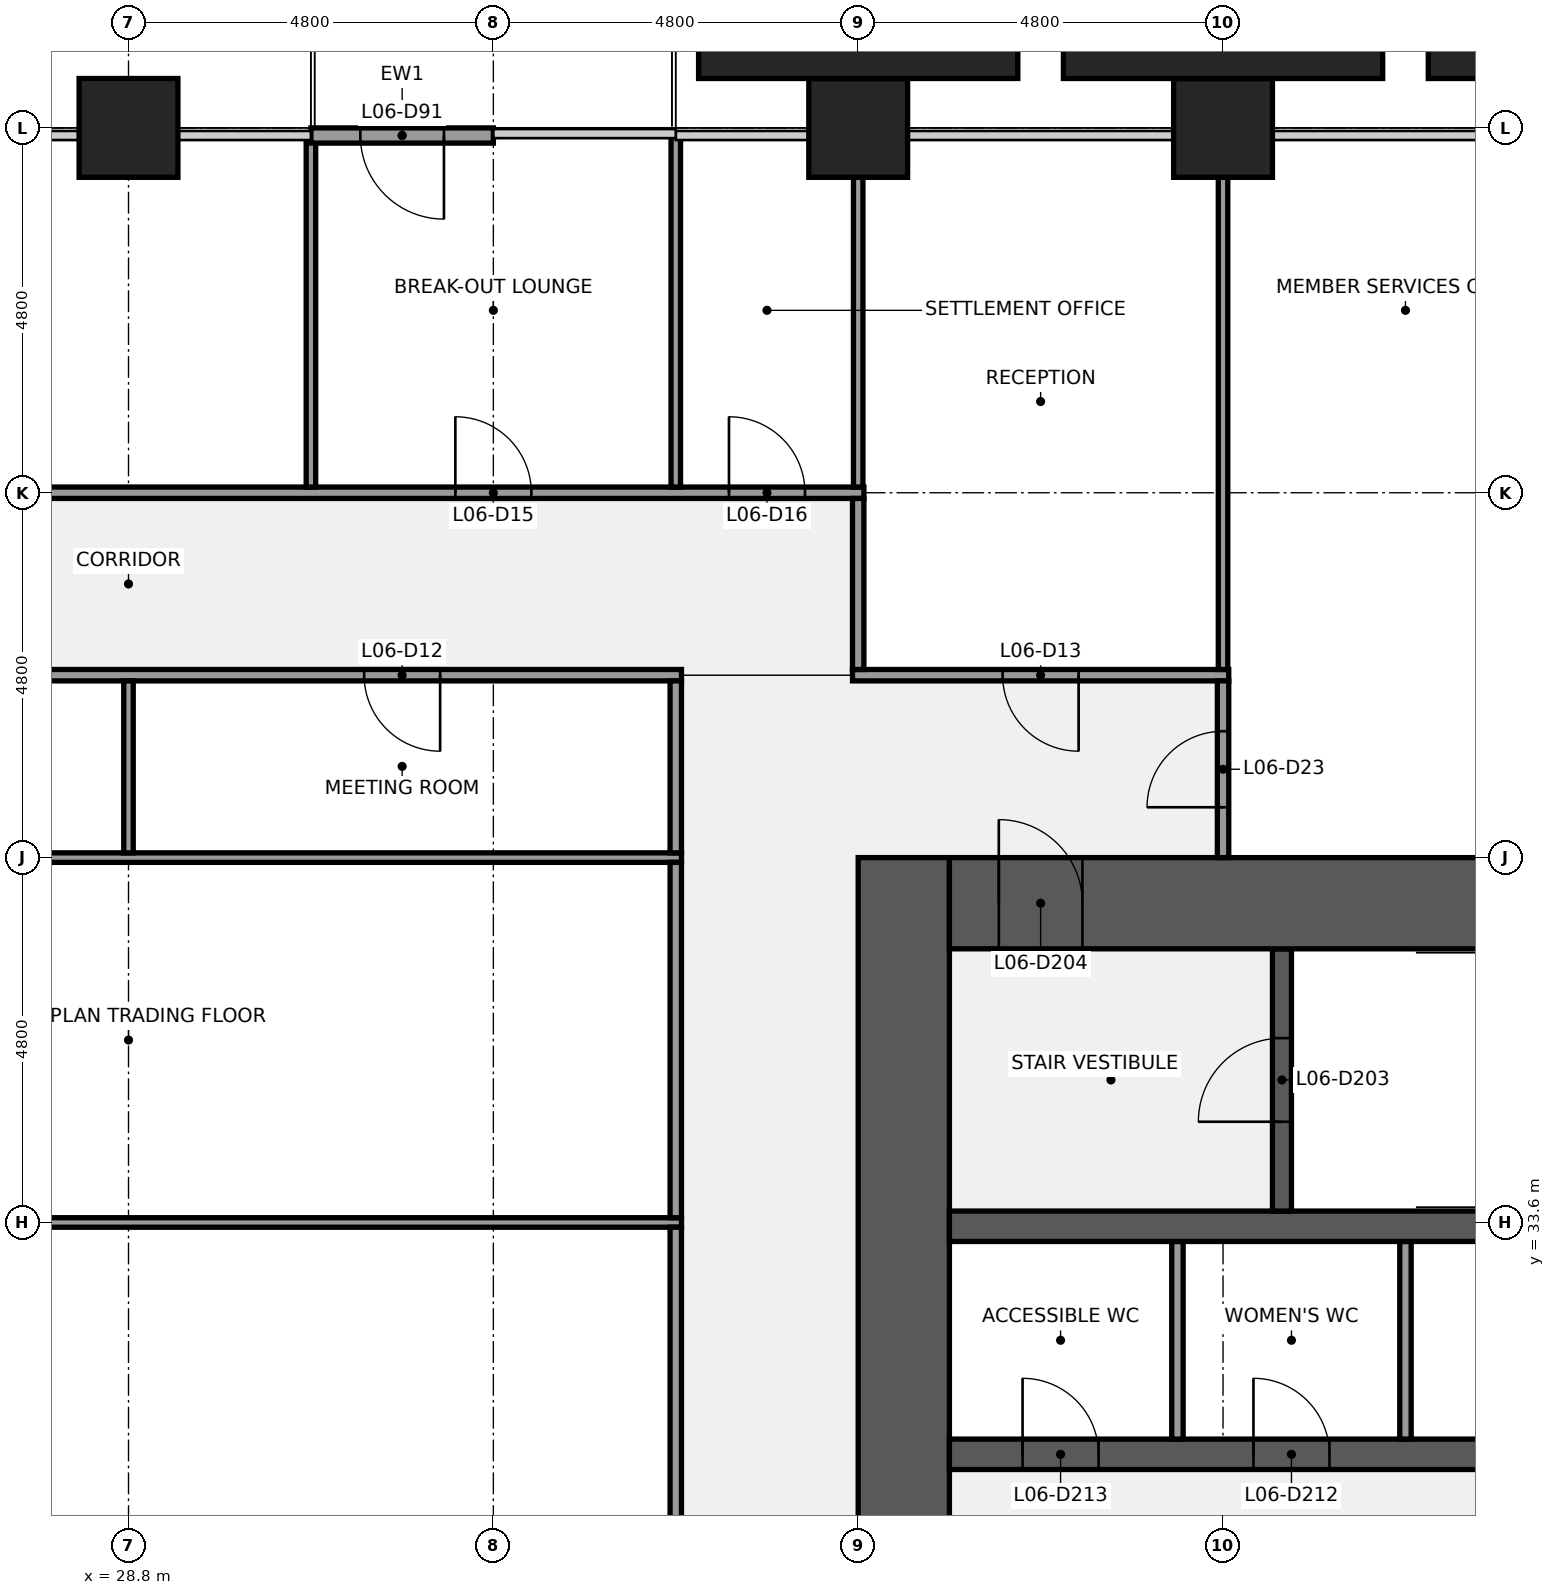
"""IFC4 building model, lengths in metres.
Left out: names, types, materials, properties, quantities, classifications, styles, units other than length and angle.
Written with IfcOpenShell. Run it as: python <this file> out.ifc"""

import sys

from ifc_helpers import new_model, si_unit, direction, frame, frame_2d, origin, origin_2d, place, context, subcontext, project, spatial, rectangle, extrude, element, fill, save


model = new_model("IFC4")
c1 = context("Model", 3, precision=1e-05, world=origin(), true_north=direction((0.0, 1.0)))
c2 = subcontext(c1, "Body", "Model", "MODEL_VIEW")
j1 = project(units=[si_unit("LENGTHUNIT", "METRE"), si_unit("PLANEANGLEUNIT", "RADIAN")], contexts=[c1])
p1 = place(None, origin())
s1 = spatial("IfcSite", under=j1, at=p1, CompositionType="ELEMENT")
p2 = place(p1, origin())
s2 = spatial("IfcBuilding", under=s1, at=p2, CompositionType="ELEMENT")
p3 = place(p2, frame((0.0, 0.0, 34.6)))
s3 = spatial("IfcBuildingStorey", under=s2, at=p3, CompositionType="ELEMENT", Elevation=34.6)
for number, where, z_axis, x_axis in (
    (1, (28.8, 48.0, 0.0), (0.0, 0.0, 1.0), (1.0, 0.0, 0.0)),
    (2, (38.4, 48.0, 0.0), (0.0, 0.0, 1.0), (1.0, 0.0, 0.0)),
    (3, (43.2, 48.0, 0.0), (0.0, 0.0, 1.0), (1.0, 0.0, 0.0)),
):
    element("IfcColumn", number, at=place(p3, frame(where, z_axis=z_axis, x_axis=x_axis)), inside=s3, PredefinedType="COLUMN", context=c2, shape_type="SweptSolid", body=[
        extrude(rectangle(XDim=1.3, YDim=1.3, at=origin_2d()), origin(), (0.0, 0.0, 1.0), 4.4),
    ])
p4 = place(p3, frame((39.0, 9.6, 0.0), z_axis=(0.0, 0.0, 1.0), x_axis=(0.0, 1.0, 0.0)))
e4 = element("IfcWall", 4, at=p4, inside=s3, PredefinedType="SHEAR", context=c2, shape_type="SweptSolid", body=[
    extrude(rectangle(XDim=28.8, YDim=1.2, at=frame_2d((14.4, 0.0))), origin(), (0.0, 0.0, 1.0), 4.24),
])
p5 = place(p4, frame((8.7, 0.0, 0.0)))
e5 = element("IfcOpeningElement", 5, at=p5, cuts=e4, PredefinedType="OPENING", context=c2, shape_type="SweptSolid", body=[
    extrude(rectangle(XDim=1.8, YDim=2.1, at=frame_2d((0.9, 1.05))), frame((0.0, 0.61, 0.0), z_axis=(0.0, -1.0, 0.0), x_axis=(1.0, 0.0, 0.0)), (0.0, 0.0, 1.0), 1.22),
])
p6 = place(p4, frame((18.3, 0.0, 0.0)))
e6 = element("IfcOpeningElement", 6, at=p6, cuts=e4, PredefinedType="OPENING", context=c2, shape_type="SweptSolid", body=[
    extrude(rectangle(XDim=1.8, YDim=2.1, at=frame_2d((0.9, 1.05))), frame((0.0, 0.61, 0.0), z_axis=(0.0, -1.0, 0.0), x_axis=(1.0, 0.0, 0.0)), (0.0, 0.0, 1.0), 1.22),
])
p7 = place(p3, frame((39.6, 30.55, 0.0), z_axis=(0.0, 0.0, 1.0), x_axis=(1.0, 0.0, 0.0)))
e7 = element("IfcWall", 7, at=p7, inside=s3, PredefinedType="SHEAR", context=c2, shape_type="SweptSolid", body=[
    extrude(rectangle(XDim=16.8, YDim=0.4, at=frame_2d((8.4, 0.0))), origin(), (0.0, 0.0, 1.0), 4.24),
])
p8 = place(p7, frame((15.137, 0.0, 0.0)))
e8 = element("IfcOpeningElement", 8, at=p8, cuts=e7, PredefinedType="OPENING", context=c2, shape_type="SweptSolid", body=[
    extrude(rectangle(XDim=1.0, YDim=2.1, at=frame_2d((0.5, 1.05))), frame((0.0, 0.21, 0.0), z_axis=(0.0, -1.0, 0.0), x_axis=(1.0, 0.0, 0.0)), (0.0, 0.0, 1.0), 0.42),
])
p9 = place(p7, frame((12.7, 0.0, 0.0)))
e9 = element("IfcOpeningElement", 9, at=p9, cuts=e7, PredefinedType="OPENING", context=c2, shape_type="SweptSolid", body=[
    extrude(rectangle(XDim=1.0, YDim=2.1, at=frame_2d((0.5, 1.05))), frame((0.0, 0.21, 0.0), z_axis=(0.0, -1.0, 0.0), x_axis=(1.0, 0.0, 0.0)), (0.0, 0.0, 1.0), 0.42),
])
p10 = place(p7, frame((8.5, 0.0, 0.0)))
e10 = element("IfcOpeningElement", 10, at=p10, cuts=e7, PredefinedType="OPENING", context=c2, shape_type="SweptSolid", body=[
    extrude(rectangle(XDim=1.0, YDim=2.1, at=frame_2d((0.5, 1.05))), frame((0.0, 0.21, 0.0), z_axis=(0.0, -1.0, 0.0), x_axis=(1.0, 0.0, 0.0)), (0.0, 0.0, 1.0), 0.42),
])
p11 = place(p7, frame((4.0, 0.0, 0.0)))
e11 = element("IfcOpeningElement", 11, at=p11, cuts=e7, PredefinedType="OPENING", context=c2, shape_type="SweptSolid", body=[
    extrude(rectangle(XDim=1.0, YDim=2.1, at=frame_2d((0.5, 1.05))), frame((0.0, 0.21, 0.0), z_axis=(0.0, -1.0, 0.0), x_axis=(1.0, 0.0, 0.0)), (0.0, 0.0, 1.0), 0.42),
])
p12 = place(p7, frame((0.962, 0.0, 0.0)))
e12 = element("IfcOpeningElement", 12, at=p12, cuts=e7, PredefinedType="OPENING", context=c2, shape_type="SweptSolid", body=[
    extrude(rectangle(XDim=1.0, YDim=2.1, at=frame_2d((0.5, 1.05))), frame((0.0, 0.21, 0.0), z_axis=(0.0, -1.0, 0.0), x_axis=(1.0, 0.0, 0.0)), (0.0, 0.0, 1.0), 0.42),
])
for number, where, z_axis, x_axis in (
    (13, (45.6, 30.75, 0.0), (0.0, 0.0, 1.0), (0.0, 1.0, 0.0)),
    (14, (42.6, 30.75, 0.0), (0.0, 0.0, 1.0), (0.0, 1.0, 0.0)),
):
    element("IfcWall", number, at=place(p3, frame(where, z_axis=z_axis, x_axis=x_axis)), inside=s3, PredefinedType="PARTITIONING", context=c2, shape_type="SweptSolid", body=[
        extrude(rectangle(XDim=2.6, YDim=0.15, at=frame_2d((1.3, 0.0))), origin(), (0.0, 0.0, 1.0), 4.24),
    ])
p13 = place(p3, frame((39.6, 33.55, 0.0), z_axis=(0.0, 0.0, 1.0), x_axis=(1.0, 0.0, 0.0)))
e15 = element("IfcWall", 15, at=p13, inside=s3, PredefinedType="SHEAR", context=c2, shape_type="SweptSolid", body=[
    extrude(rectangle(XDim=16.8, YDim=0.4, at=frame_2d((8.4, 0.0))), origin(), (0.0, 0.0, 1.0), 4.24),
])
p14 = place(p3, frame((43.975, 33.75, 0.0), z_axis=(0.0, 0.0, 1.0), x_axis=(0.0, 1.0, 0.0)))
e16 = element("IfcWall", 16, at=p14, inside=s3, PredefinedType="SHEAR", context=c2, shape_type="SweptSolid", body=[
    extrude(rectangle(XDim=3.45, YDim=0.25, at=frame_2d((1.725, 0.0))), origin(), (0.0, 0.0, 1.0), 4.24),
])
p15 = place(p14, frame((1.175, 0.0, 0.0)))
e17 = element("IfcOpeningElement", 17, at=p15, cuts=e16, PredefinedType="OPENING", context=c2, shape_type="SweptSolid", body=[
    extrude(rectangle(XDim=1.1, YDim=2.1, at=frame_2d((0.55, 1.05))), frame((0.0, 0.135, 0.0), z_axis=(0.0, -1.0, 0.0), x_axis=(1.0, 0.0, 0.0)), (0.0, 0.0, 1.0), 0.27),
])
p16 = place(p3, frame((39.6, 37.8, 0.0), z_axis=(0.0, 0.0, 1.0), x_axis=(1.0, 0.0, 0.0)))
e18 = element("IfcWall", 18, at=p16, inside=s3, PredefinedType="SHEAR", context=c2, shape_type="SweptSolid", body=[
    extrude(rectangle(XDim=13.2, YDim=1.2, at=frame_2d((6.6, 0.0))), origin(), (0.0, 0.0, 1.0), 4.24),
])
p17 = place(p16, frame((0.65, 0.0, 0.0)))
e19 = element("IfcOpeningElement", 19, at=p17, cuts=e18, PredefinedType="OPENING", context=c2, shape_type="SweptSolid", body=[
    extrude(rectangle(XDim=1.1, YDim=2.1, at=frame_2d((0.55, 1.05))), frame((0.0, 0.61, 0.0), z_axis=(0.0, -1.0, 0.0), x_axis=(1.0, 0.0, 0.0)), (0.0, 0.0, 1.0), 1.22),
])
for number, where, z_axis, x_axis in (
    (20, (21.525, 33.6, 0.0), (0.0, 0.0, 1.0), (1.0, 0.0, 0.0)),
    (21, (21.525, 38.4, 0.0), (0.0, 0.0, 1.0), (1.0, 0.0, 0.0)),
):
    element("IfcWall", number, at=place(p3, frame(where, z_axis=z_axis, x_axis=x_axis)), inside=s3, PredefinedType="PARTITIONING", context=c2, shape_type="SweptSolid", body=[
        extrude(rectangle(XDim=14.55, YDim=0.125, at=frame_2d((7.275, 0.0))), origin(), (0.0, 0.0, 1.0), 3.27),
    ])
p18 = place(p3, frame((21.525, 40.8, 0.0), z_axis=(0.0, 0.0, 1.0), x_axis=(1.0, 0.0, 0.0)))
e22 = element("IfcWall", 22, at=p18, inside=s3, PredefinedType="PARTITIONING", context=c2, shape_type="SweptSolid", body=[
    extrude(rectangle(XDim=14.55, YDim=0.15, at=frame_2d((7.275, 0.0))), origin(), (0.0, 0.0, 1.0), 3.27),
])
p19 = place(p18, frame((3.175, 0.0, 0.0)))
e23 = element("IfcOpeningElement", 23, at=p19, cuts=e22, PredefinedType="OPENING", context=c2, shape_type="SweptSolid", body=[
    extrude(rectangle(XDim=1.0, YDim=2.1, at=frame_2d((0.5, 1.05))), frame((0.0, 0.085, 0.0), z_axis=(0.0, -1.0, 0.0), x_axis=(1.0, 0.0, 0.0)), (0.0, 0.0, 1.0), 0.17),
])
p20 = place(p18, frame((10.375, 0.0, 0.0)))
e24 = element("IfcOpeningElement", 24, at=p20, cuts=e22, PredefinedType="OPENING", context=c2, shape_type="SweptSolid", body=[
    extrude(rectangle(XDim=1.0, YDim=2.1, at=frame_2d((0.5, 1.05))), frame((0.0, 0.085, 0.0), z_axis=(0.0, -1.0, 0.0), x_axis=(1.0, 0.0, 0.0)), (0.0, 0.0, 1.0), 0.17),
])
p21 = place(p3, frame((38.325, 40.8, 0.0), z_axis=(0.0, 0.0, 1.0), x_axis=(1.0, 0.0, 0.0)))
e25 = element("IfcWall", 25, at=p21, inside=s3, PredefinedType="PARTITIONING", context=c2, shape_type="SweptSolid", body=[
    extrude(rectangle(XDim=4.95, YDim=0.15, at=frame_2d((2.475, 0.0))), origin(), (0.0, 0.0, 1.0), 3.27),
])
p22 = place(p21, frame((1.975, 0.0, 0.0)))
e26 = element("IfcOpeningElement", 26, at=p22, cuts=e25, PredefinedType="OPENING", context=c2, shape_type="SweptSolid", body=[
    extrude(rectangle(XDim=1.0, YDim=2.1, at=frame_2d((0.5, 1.05))), frame((0.0, 0.085, 0.0), z_axis=(0.0, -1.0, 0.0), x_axis=(1.0, 0.0, 0.0)), (0.0, 0.0, 1.0), 0.17),
])
p23 = place(p3, frame((19.125, 43.2, 0.0), z_axis=(0.0, 0.0, 1.0), x_axis=(1.0, 0.0, 0.0)))
e27 = element("IfcWall", 27, at=p23, inside=s3, PredefinedType="PARTITIONING", context=c2, shape_type="SweptSolid", body=[
    extrude(rectangle(XDim=19.35, YDim=0.15, at=frame_2d((9.675, 0.0))), origin(), (0.0, 0.0, 1.0), 3.27),
])
p24 = place(p23, frame((5.575, 0.0, 0.0)))
e28 = element("IfcOpeningElement", 28, at=p24, cuts=e27, PredefinedType="OPENING", context=c2, shape_type="SweptSolid", body=[
    extrude(rectangle(XDim=1.0, YDim=2.1, at=frame_2d((0.5, 1.05))), frame((0.0, 0.085, 0.0), z_axis=(0.0, -1.0, 0.0), x_axis=(1.0, 0.0, 0.0)), (0.0, 0.0, 1.0), 0.17),
])
p25 = place(p23, frame((13.975, 0.0, 0.0)))
e29 = element("IfcOpeningElement", 29, at=p25, cuts=e27, PredefinedType="OPENING", context=c2, shape_type="SweptSolid", body=[
    extrude(rectangle(XDim=1.0, YDim=2.1, at=frame_2d((0.5, 1.05))), frame((0.0, 0.085, 0.0), z_axis=(0.0, -1.0, 0.0), x_axis=(1.0, 0.0, 0.0)), (0.0, 0.0, 1.0), 0.17),
])
p26 = place(p23, frame((17.575, 0.0, 0.0)))
e30 = element("IfcOpeningElement", 30, at=p26, cuts=e27, PredefinedType="OPENING", context=c2, shape_type="SweptSolid", body=[
    extrude(rectangle(XDim=1.0, YDim=2.1, at=frame_2d((0.5, 1.05))), frame((0.0, 0.085, 0.0), z_axis=(0.0, -1.0, 0.0), x_axis=(1.0, 0.0, 0.0)), (0.0, 0.0, 1.0), 0.17),
])
p27 = place(p3, frame((28.8, 38.462, 0.0), z_axis=(0.0, 0.0, 1.0), x_axis=(0.0, 1.0, 0.0)))
e31 = element("IfcWall", 31, at=p27, inside=s3, PredefinedType="PARTITIONING", context=c2, shape_type="SweptSolid", body=[
    extrude(rectangle(XDim=2.263, YDim=0.125, at=frame_2d((1.131, 0.0))), origin(), (0.0, 0.0, 1.0), 3.27),
])
for number, where, z_axis, x_axis in (
    (32, (31.2, 43.275, 0.0), (0.0, 0.0, 1.0), (0.0, 1.0, 0.0)),
    (33, (36.0, 43.275, 0.0), (0.0, 0.0, 1.0), (0.0, 1.0, 0.0)),
):
    element("IfcWall", number, at=place(p3, frame(where, z_axis=z_axis, x_axis=x_axis)), inside=s3, PredefinedType="PARTITIONING", context=c2, shape_type="SweptSolid", body=[
        extrude(rectangle(XDim=4.625, YDim=0.125, at=frame_2d((2.312, 0.0))), origin(), (0.0, 0.0, 1.0), 3.27),
    ])
p28 = place(p3, frame((36.0, 24.062, 0.0), z_axis=(0.0, 0.0, 1.0), x_axis=(0.0, 1.0, 0.0)))
e34 = element("IfcWall", 34, at=p28, inside=s3, PredefinedType="PARTITIONING", context=c2, shape_type="SweptSolid", body=[
    extrude(rectangle(XDim=9.475, YDim=0.15, at=frame_2d((4.738, 0.0))), origin(), (0.0, 0.0, 1.0), 3.27),
])
p29 = place(p3, frame((36.0, 33.663, 0.0), z_axis=(0.0, 0.0, 1.0), x_axis=(0.0, 1.0, 0.0)))
e35 = element("IfcWall", 35, at=p29, inside=s3, PredefinedType="PARTITIONING", context=c2, shape_type="SweptSolid", body=[
    extrude(rectangle(XDim=4.675, YDim=0.15, at=frame_2d((2.337, 0.0))), origin(), (0.0, 0.0, 1.0), 3.27),
])
p30 = place(p3, frame((36.0, 38.462, 0.0), z_axis=(0.0, 0.0, 1.0), x_axis=(0.0, 1.0, 0.0)))
e36 = element("IfcWall", 36, at=p30, inside=s3, PredefinedType="PARTITIONING", context=c2, shape_type="SweptSolid", body=[
    extrude(rectangle(XDim=2.263, YDim=0.15, at=frame_2d((1.131, 0.0))), origin(), (0.0, 0.0, 1.0), 3.27),
])
p31 = place(p3, frame((38.4, 43.275, 0.0), z_axis=(0.0, 0.0, 1.0), x_axis=(0.0, 1.0, 0.0)))
e37 = element("IfcWall", 37, at=p31, inside=s3, PredefinedType="PARTITIONING", context=c2, shape_type="SweptSolid", body=[
    extrude(rectangle(XDim=4.075, YDim=0.125, at=frame_2d((2.038, 0.0))), origin(), (0.0, 0.0, 1.0), 3.27),
])
p32 = place(p3, frame((38.4, 40.875, 0.0), z_axis=(0.0, 0.0, 1.0), x_axis=(0.0, 1.0, 0.0)))
e38 = element("IfcWall", 38, at=p32, inside=s3, PredefinedType="PARTITIONING", context=c2, shape_type="SweptSolid", body=[
    extrude(rectangle(XDim=2.25, YDim=0.15, at=frame_2d((1.125, 0.0))), origin(), (0.0, 0.0, 1.0), 3.27),
])
p33 = place(p3, frame((43.2, 40.875, 0.0), z_axis=(0.0, 0.0, 1.0), x_axis=(0.0, 1.0, 0.0)))
e39 = element("IfcWall", 39, at=p33, inside=s3, PredefinedType="PARTITIONING", context=c2, shape_type="SweptSolid", body=[
    extrude(rectangle(XDim=6.475, YDim=0.125, at=frame_2d((3.238, 0.0))), origin(), (0.0, 0.0, 1.0), 3.27),
])
p34 = place(p3, frame((43.2, 38.4, 0.0), z_axis=(0.0, 0.0, 1.0), x_axis=(0.0, 1.0, 0.0)))
e40 = element("IfcWall", 40, at=p34, inside=s3, PredefinedType="PARTITIONING", context=c2, shape_type="SweptSolid", body=[
    extrude(rectangle(XDim=2.325, YDim=0.15, at=frame_2d((1.163, 0.0))), origin(), (0.0, 0.0, 1.0), 3.27),
])
p35 = place(p34, frame((0.663, 0.0, 0.0)))
e41 = element("IfcOpeningElement", 41, at=p35, cuts=e40, PredefinedType="OPENING", context=c2, shape_type="SweptSolid", body=[
    extrude(rectangle(XDim=1.0, YDim=2.1, at=frame_2d((0.5, 1.05))), frame((0.0, 0.085, 0.0), z_axis=(0.0, -1.0, 0.0), x_axis=(1.0, 0.0, 0.0)), (0.0, 0.0, 1.0), 0.17),
])
p36 = place(p3, frame((33.6, 47.9, 0.0), z_axis=(0.0, 0.0, 1.0), x_axis=(-1.0, 0.0, 0.0)))
e42 = element("IfcWall", 42, at=p36, inside=s3, PredefinedType="SOLIDWALL", context=c2, shape_type="SweptSolid", body=[
    extrude(rectangle(XDim=2.4, YDim=0.2, at=frame_2d((1.2, 0.0))), origin(), (0.0, 0.0, 1.0), 3.714),
])
p37 = place(p36, frame((0.65, 0.0, 0.0)))
e43 = element("IfcOpeningElement", 43, at=p37, cuts=e42, PredefinedType="OPENING", context=c2, shape_type="SweptSolid", body=[
    extrude(rectangle(XDim=1.1, YDim=2.1, at=frame_2d((0.55, 1.05))), frame((0.0, 0.11, 0.0), z_axis=(0.0, -1.0, 0.0), x_axis=(1.0, 0.0, 0.0)), (0.0, 0.0, 1.0), 0.22),
])
for number, where, z_axis, x_axis in (
    (44, (38.4, 49.075, 0.0), (0.0, 0.0, 1.0), (1.0, 0.0, 0.0)),
    (45, (43.2, 49.075, 0.0), (0.0, 0.0, 1.0), (1.0, 0.0, 0.0)),
    (46, (48.0, 49.075, 0.0), (0.0, 0.0, 1.0), (1.0, 0.0, 0.0)),
):
    element("IfcColumn", number, at=place(p3, frame(where, z_axis=z_axis, x_axis=x_axis)), inside=s3, PredefinedType="PILASTER", context=c2, shape_type="SweptSolid", body=[
        extrude(rectangle(XDim=4.2, YDim=0.85, at=origin_2d()), origin(), (0.0, 0.0, 1.0), 4.4),
    ])
p38 = place(p15, origin())
e47 = element("IfcDoor", 47, at=p38, inside=s3, OperationType="SINGLE_SWING_LEFT", PredefinedType="DOOR", context=c2, shape_type="SweptSolid", body=[
    extrude(rectangle(XDim=1.1, YDim=2.1, at=frame_2d((0.55, 1.05))), frame((0.0, 0.025, 0.0), z_axis=(0.0, -1.0, 0.0), x_axis=(1.0, 0.0, 0.0)), (0.0, 0.0, 1.0), 0.05),
])
fill(e17, e47)
p39 = place(p17, origin())
e48 = element("IfcDoor", 48, at=p39, inside=s3, OperationType="SINGLE_SWING_LEFT", PredefinedType="DOOR", context=c2, shape_type="SweptSolid", body=[
    extrude(rectangle(XDim=1.1, YDim=2.1, at=frame_2d((0.55, 1.05))), frame((0.0, 0.025, 0.0), z_axis=(0.0, -1.0, 0.0), x_axis=(1.0, 0.0, 0.0)), (0.0, 0.0, 1.0), 0.05),
])
fill(e19, e48)
p40 = place(p11, origin())
e49 = element("IfcDoor", 49, at=p40, inside=s3, OperationType="SINGLE_SWING_LEFT", PredefinedType="DOOR", context=c2, shape_type="SweptSolid", body=[
    extrude(rectangle(XDim=1.0, YDim=2.1, at=frame_2d((0.5, 1.05))), frame((0.0, 0.025, 0.0), z_axis=(0.0, -1.0, 0.0), x_axis=(1.0, 0.0, 0.0)), (0.0, 0.0, 1.0), 0.05),
])
fill(e11, e49)
p41 = place(p12, origin())
e50 = element("IfcDoor", 50, at=p41, inside=s3, OperationType="SINGLE_SWING_LEFT", PredefinedType="DOOR", context=c2, shape_type="SweptSolid", body=[
    extrude(rectangle(XDim=1.0, YDim=2.1, at=frame_2d((0.5, 1.05))), frame((0.0, 0.025, 0.0), z_axis=(0.0, -1.0, 0.0), x_axis=(1.0, 0.0, 0.0)), (0.0, 0.0, 1.0), 0.05),
])
fill(e12, e50)
p42 = place(p20, origin())
e51 = element("IfcDoor", 51, at=p42, inside=s3, OperationType="SINGLE_SWING_RIGHT", PredefinedType="DOOR", context=c2, shape_type="SweptSolid", body=[
    extrude(rectangle(XDim=1.0, YDim=2.1, at=frame_2d((0.5, 1.05))), frame((0.0, 0.025, 0.0), z_axis=(0.0, -1.0, 0.0), x_axis=(1.0, 0.0, 0.0)), (0.0, 0.0, 1.0), 0.05),
])
fill(e24, e51)
p43 = place(p22, origin())
e52 = element("IfcDoor", 52, at=p43, inside=s3, OperationType="SINGLE_SWING_RIGHT", PredefinedType="DOOR", context=c2, shape_type="SweptSolid", body=[
    extrude(rectangle(XDim=1.0, YDim=2.1, at=frame_2d((0.5, 1.05))), frame((0.0, 0.025, 0.0), z_axis=(0.0, -1.0, 0.0), x_axis=(1.0, 0.0, 0.0)), (0.0, 0.0, 1.0), 0.05),
])
fill(e26, e52)
p44 = place(p25, origin())
e53 = element("IfcDoor", 53, at=p44, inside=s3, OperationType="SINGLE_SWING_LEFT", PredefinedType="DOOR", context=c2, shape_type="SweptSolid", body=[
    extrude(rectangle(XDim=1.0, YDim=2.1, at=frame_2d((0.5, 1.05))), frame((0.0, 0.025, 0.0), z_axis=(0.0, -1.0, 0.0), x_axis=(1.0, 0.0, 0.0)), (0.0, 0.0, 1.0), 0.05),
])
fill(e29, e53)
p45 = place(p26, origin())
e54 = element("IfcDoor", 54, at=p45, inside=s3, OperationType="SINGLE_SWING_LEFT", PredefinedType="DOOR", context=c2, shape_type="SweptSolid", body=[
    extrude(rectangle(XDim=1.0, YDim=2.1, at=frame_2d((0.5, 1.05))), frame((0.0, 0.025, 0.0), z_axis=(0.0, -1.0, 0.0), x_axis=(1.0, 0.0, 0.0)), (0.0, 0.0, 1.0), 0.05),
])
fill(e30, e54)
p46 = place(p35, origin())
e55 = element("IfcDoor", 55, at=p46, inside=s3, OperationType="SINGLE_SWING_LEFT", PredefinedType="DOOR", context=c2, shape_type="SweptSolid", body=[
    extrude(rectangle(XDim=1.0, YDim=2.1, at=frame_2d((0.5, 1.05))), frame((0.0, 0.025, 0.0), z_axis=(0.0, -1.0, 0.0), x_axis=(1.0, 0.0, 0.0)), (0.0, 0.0, 1.0), 0.05),
])
fill(e41, e55)
p47 = place(p37, origin())
e56 = element("IfcDoor", 56, at=p47, inside=s3, OperationType="SINGLE_SWING_LEFT", PredefinedType="DOOR", context=c2, shape_type="SweptSolid", body=[
    extrude(rectangle(XDim=1.1, YDim=2.1, at=frame_2d((0.55, 1.05))), frame((0.0, 0.025, 0.0), z_axis=(0.0, -1.0, 0.0), x_axis=(1.0, 0.0, 0.0)), (0.0, 0.0, 1.0), 0.05),
])
fill(e43, e56)
save(model, sys.argv[1])
